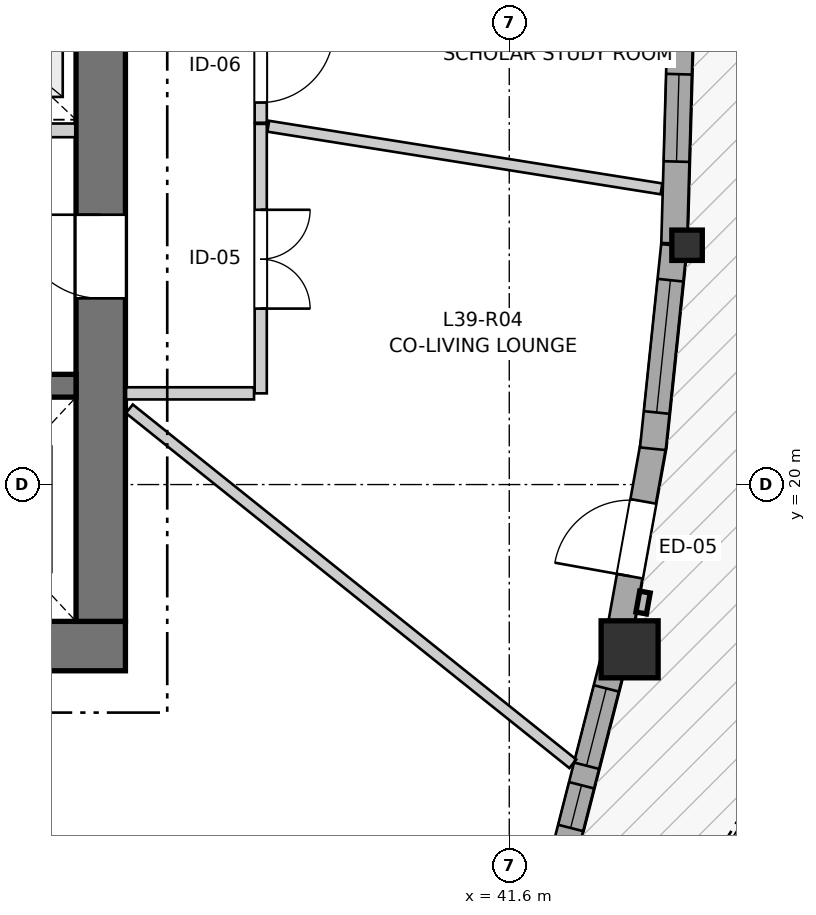
"""IFC4 building model, lengths in metres.
Left out: names, types, materials, properties, quantities, classifications, styles, units other than length and angle.
Written with IfcOpenShell. Run it as: python <this file> out.ifc"""

import sys

from ifc_helpers import new_model, si_unit, direction, frame, frame_2d, origin, origin_2d, place, context, subcontext, project, spatial, rectangle, i_section, extrude, source, transform, mapped, element, fill, save


model = new_model("IFC4")
c1 = context("Model", 3, precision=1e-05, world=origin(), true_north=direction((0.0, 1.0)))
c2 = subcontext(c1, "Body", "Model", "MODEL_VIEW")
j1 = project(units=[si_unit("LENGTHUNIT", "METRE"), si_unit("PLANEANGLEUNIT", "RADIAN")], contexts=[c1])
p1 = place(None, origin())
s1 = spatial("IfcSite", under=j1, at=p1, CompositionType="ELEMENT")
p2 = place(p1, origin())
s2 = spatial("IfcBuilding", under=s1, at=p2, CompositionType="ELEMENT")
p3 = place(p2, frame((0.0, 0.0, 133.0)))
s3 = spatial("IfcBuildingStorey", under=s2, at=p3, CompositionType="ELEMENT", Elevation=133.0)
p4 = place(p3, frame((24.15, 17.875, 0.0), z_axis=(0.0, 0.0, 1.0), x_axis=(1.0, 0.0, 0.0)))
e1 = element("IfcWall", 1, at=p4, inside=s3, PredefinedType="SHEAR", context=c2, shape_type="SweptSolid", body=[
    extrude(rectangle(XDim=12.4, YDim=0.65, at=frame_2d((6.2, 0.0))), origin(), (0.0, 0.0, 1.0), 2.95),
])
p5 = place(p3, frame((36.225, 18.2, 0.0), z_axis=(0.0, 0.0, 1.0), x_axis=(0.0, 1.0, 0.0)))
e2 = element("IfcWall", 2, at=p5, inside=s3, PredefinedType="SHEAR", context=c2, shape_type="SweptSolid", body=[
    extrude(rectangle(XDim=15.6, YDim=0.65, at=frame_2d((7.8, 0.0))), origin(), (0.0, 0.0, 1.0), 2.95),
])
p6 = place(p5, frame((4.25, 0.0, 0.0)))
e3 = element("IfcOpeningElement", 3, at=p6, cuts=e2, PredefinedType="OPENING", context=c2, shape_type="SweptSolid", body=[
    extrude(rectangle(XDim=1.1, YDim=2.15, at=frame_2d((0.55, 1.075))), frame((0.0, 0.335, 0.0), z_axis=(0.0, -1.0, 0.0), x_axis=(1.0, 0.0, 0.0)), (0.0, 0.0, 1.0), 0.67),
])
p7 = place(p5, frame((10.25, 0.0, 0.0)))
e4 = element("IfcOpeningElement", 4, at=p7, cuts=e2, PredefinedType="OPENING", context=c2, shape_type="SweptSolid", body=[
    extrude(rectangle(XDim=1.1, YDim=2.15, at=frame_2d((0.55, 1.075))), frame((0.0, 0.335, 0.0), z_axis=(0.0, -1.0, 0.0), x_axis=(1.0, 0.0, 0.0)), (0.0, 0.0, 1.0), 0.67),
])
p8 = place(p3, frame((24.8, 21.3, 0.0), z_axis=(0.0, 0.0, 1.0), x_axis=(1.0, 0.0, 0.0)))
e5 = element("IfcWall", 5, at=p8, inside=s3, PredefinedType="SHEAR", context=c2, shape_type="SweptSolid", body=[
    extrude(rectangle(XDim=11.1, YDim=0.3, at=frame_2d((5.55, 0.0))), origin(), (0.0, 0.0, 1.0), 2.95),
])
p9 = place(p8, frame((6.22, 0.0, 0.0)))
e6 = element("IfcOpeningElement", 6, at=p9, cuts=e5, PredefinedType="OPENING", context=c2, shape_type="SweptSolid", body=[
    extrude(rectangle(XDim=0.98, YDim=2.15, at=frame_2d((0.49, 1.075))), frame((0.0, 0.16, 0.0), z_axis=(0.0, -1.0, 0.0), x_axis=(1.0, 0.0, 0.0)), (0.0, 0.0, 1.0), 0.32),
])
p10 = place(p8, frame((9.15, 0.0, 0.0)))
e7 = element("IfcOpeningElement", 7, at=p10, cuts=e5, PredefinedType="OPENING", context=c2, shape_type="SweptSolid", body=[
    extrude(rectangle(XDim=1.15, YDim=2.15, at=frame_2d((0.575, 1.075))), frame((0.0, 0.16, 0.0), z_axis=(0.0, -1.0, 0.0), x_axis=(1.0, 0.0, 0.0)), (0.0, 0.0, 1.0), 0.32),
])
m1 = source(origin(), c2, "Body", "SweptSolid", [
    extrude(rectangle(XDim=0.75, YDim=0.75, at=origin_2d()), origin(), (0.0, 0.0, 1.0), 2.95),
])
p11 = place(p3, frame((43.184, 17.833, 0.0), z_axis=(0.0, 0.0, 1.0), x_axis=(1.0, 0.0, 0.0)))
e8 = element("IfcColumn", 8, at=p11, inside=s3, PredefinedType="COLUMN", context=c2, shape_type="MappedRepresentation", body=[
    mapped(m1, transform((0.0, 0.0, 0.0), x_axis=(1.0, 0.0, 0.0), y_axis=(0.0, 1.0, 0.0), z_axis=(0.0, 0.0, 1.0), scale=1.0)),
])
m2 = source(origin(), c2, "Body", "SweptSolid", [
    extrude(i_section(OverallWidth=0.401, OverallDepth=0.399, WebThickness=0.023, FlangeThickness=0.036, FilletRadius=0.015, at=origin_2d()), origin(), (0.0, 0.0, 1.0), 2.95),
])
p12 = place(p3, frame((43.939, 23.148, 0.0), z_axis=(0.0, 0.0, 1.0), x_axis=(1.0, 0.0, 0.0)))
e9 = element("IfcColumn", 9, at=p12, inside=s3, PredefinedType="PILASTER", context=c2, shape_type="MappedRepresentation", body=[
    mapped(m2, transform((0.0, 0.0, 0.0), x_axis=(1.0, 0.0, 0.0), y_axis=(0.0, 1.0, 0.0), z_axis=(0.0, 0.0, 1.0), scale=1.0)),
])
p13 = place(p3, frame((42.329, 15.177, 0.0), z_axis=(0.0, 0.0, 1.0), x_axis=(0.247819063092, 0.968806333571, 0.0)))
e10 = element("IfcWall", 10, at=p13, inside=s3, PredefinedType="SOLIDWALL", context=c2, shape_type="SweptSolid", body=[
    extrude(rectangle(XDim=2.629, YDim=0.34, at=frame_2d((1.315, 0.0))), origin(), (0.0, 0.0, 1.0), 2.53),
])
p14 = place(p13, frame((0.315, 0.0, 0.82)))
e11 = element("IfcOpeningElement", 11, at=p14, cuts=e10, PredefinedType="OPENING", context=c2, shape_type="SweptSolid", body=[
    extrude(rectangle(XDim=0.58, YDim=1.35, at=frame_2d((0.29, 0.675))), frame((0.0, 0.18, 0.0), z_axis=(0.0, -1.0, 0.0), x_axis=(1.0, 0.0, 0.0)), (0.0, 0.0, 1.0), 0.36),
])
p15 = place(p13, frame((1.16, 0.0, 0.82)))
e12 = element("IfcOpeningElement", 12, at=p15, cuts=e10, PredefinedType="OPENING", context=c2, shape_type="SweptSolid", body=[
    extrude(rectangle(XDim=1.05, YDim=1.45, at=frame_2d((0.525, 0.725))), frame((0.0, 0.18, 0.0), z_axis=(0.0, -1.0, 0.0), x_axis=(1.0, 0.0, 0.0)), (0.0, 0.0, 1.0), 0.36),
])
p16 = place(p3, frame((43.044, 18.015, 0.0), z_axis=(0.0, 0.0, 1.0), x_axis=(0.177114569603, 0.984190240367, 0.0)))
e13 = element("IfcWall", 13, at=p16, inside=s3, PredefinedType="SOLIDWALL", context=c2, shape_type="SweptSolid", body=[
    extrude(rectangle(XDim=2.584, YDim=0.34, at=frame_2d((1.292, 0.0))), origin(), (0.0, 0.0, 1.0), 2.53),
])
p17 = place(p16, frame((0.792, 0.0, 0.0)))
e14 = element("IfcOpeningElement", 14, at=p17, cuts=e13, PredefinedType="OPENING", context=c2, shape_type="SweptSolid", body=[
    extrude(rectangle(XDim=1.0, YDim=2.1, at=frame_2d((0.5, 1.05))), frame((0.0, 0.18, 0.0), z_axis=(0.0, -1.0, 0.0), x_axis=(1.0, 0.0, 0.0)), (0.0, 0.0, 1.0), 0.36),
])
p18 = place(p3, frame((43.49, 20.471, 0.0), z_axis=(0.0, 0.0, 1.0), x_axis=(0.103673439924, 0.99461139037, 0.0)))
e15 = element("IfcWall", 15, at=p18, inside=s3, PredefinedType="SOLIDWALL", context=c2, shape_type="SweptSolid", body=[
    extrude(rectangle(XDim=2.689, YDim=0.34, at=frame_2d((1.345, 0.0))), origin(), (0.0, 0.0, 1.0), 2.53),
])
p19 = place(p18, frame((0.48, 0.0, 0.82)))
e16 = element("IfcOpeningElement", 16, at=p19, cuts=e15, PredefinedType="OPENING", context=c2, shape_type="SweptSolid", body=[
    extrude(rectangle(XDim=1.75, YDim=1.3, at=frame_2d((0.875, 0.65))), frame((0.0, 0.18, 0.0), z_axis=(0.0, -1.0, 0.0), x_axis=(1.0, 0.0, 0.0)), (0.0, 0.0, 1.0), 0.36),
])
p20 = place(p3, frame((43.77, 23.173, 0.0), z_axis=(0.0, 0.0, 1.0), x_axis=(0.028392968923, 0.999596838388, 0.0)))
e17 = element("IfcWall", 17, at=p20, inside=s3, PredefinedType="SOLIDWALL", context=c2, shape_type="SweptSolid", body=[
    extrude(rectangle(XDim=2.674, YDim=0.34, at=frame_2d((1.337, 0.0))), origin(), (0.0, 0.0, 1.0), 2.53),
])
p21 = place(p20, frame((1.076, 0.0, 0.82)))
e18 = element("IfcOpeningElement", 18, at=p21, cuts=e17, PredefinedType="OPENING", context=c2, shape_type="SweptSolid", body=[
    extrude(rectangle(XDim=1.15, YDim=1.2, at=frame_2d((0.575, 0.6))), frame((0.0, 0.18, 0.0), z_axis=(0.0, -1.0, 0.0), x_axis=(1.0, 0.0, 0.0)), (0.0, 0.0, 1.0), 0.36),
])
p22 = place(p3, frame((30.67, 24.66, 0.0), z_axis=(0.0, 0.0, 1.0), x_axis=(1.0, 0.0, 0.0)))
e19 = element("IfcWall", 19, at=p22, inside=s3, PredefinedType="PARTITIONING", context=c2, shape_type="SweptSolid", body=[
    extrude(rectangle(XDim=5.22, YDim=0.18, at=frame_2d((2.61, 0.0))), origin(), (0.0, 0.0, 1.0), 2.95),
])
p23 = place(p22, frame((0.68, 0.0, 0.0)))
e20 = element("IfcOpeningElement", 20, at=p23, cuts=e19, PredefinedType="OPENING", context=c2, shape_type="SweptSolid", body=[
    extrude(rectangle(XDim=0.98, YDim=2.15, at=frame_2d((0.49, 1.075))), frame((0.0, 0.1, 0.0), z_axis=(0.0, -1.0, 0.0), x_axis=(1.0, 0.0, 0.0)), (0.0, 0.0, 1.0), 0.2),
])
p24 = place(p3, frame((38.33, 24.745, 0.0), z_axis=(0.0, 0.0, 1.0), x_axis=(0.0, -1.0, 0.0)))
e21 = element("IfcWall", 21, at=p24, inside=s3, PredefinedType="PARTITIONING", context=c2, shape_type="SweptSolid", body=[
    extrude(rectangle(XDim=3.545, YDim=0.16, at=frame_2d((1.772, 0.0))), origin(), (0.0, 0.0, 1.0), 2.95),
])
p25 = place(p24, frame((1.13, 0.0, 0.0)))
e22 = element("IfcOpeningElement", 22, at=p25, cuts=e21, PredefinedType="OPENING", context=c2, shape_type="SweptSolid", body=[
    extrude(rectangle(XDim=1.3, YDim=2.1, at=frame_2d((0.65, 1.05))), frame((0.0, 0.09, 0.0), z_axis=(0.0, -1.0, 0.0), x_axis=(1.0, 0.0, 0.0)), (0.0, 0.0, 1.0), 0.18),
])
p26 = place(p3, frame((38.33, 26.252, 0.0), z_axis=(0.0, 0.0, 1.0), x_axis=(0.0, -1.0, 0.0)))
e23 = element("IfcWall", 23, at=p26, inside=s3, PredefinedType="PARTITIONING", context=c2, shape_type="SweptSolid", body=[
    extrude(rectangle(XDim=1.492, YDim=0.16, at=frame_2d((0.746, 0.0))), origin(), (0.0, 0.0, 1.0), 2.95),
])
p27 = place(p26, frame((0.266, 0.0, 0.0)))
e24 = element("IfcOpeningElement", 24, at=p27, cuts=e23, PredefinedType="OPENING", context=c2, shape_type="SweptSolid", body=[
    extrude(rectangle(XDim=0.96, YDim=2.1, at=frame_2d((0.48, 1.05))), frame((0.0, 0.09, 0.0), z_axis=(0.0, -1.0, 0.0), x_axis=(1.0, 0.0, 0.0)), (0.0, 0.0, 1.0), 0.18),
])
p28 = place(p3, frame((36.602, 20.997, 0.0), z_axis=(0.0, 0.0, 1.0), x_axis=(0.780696683128, -0.624910144703, 0.0)))
e25 = element("IfcWall", 25, at=p28, inside=s3, PredefinedType="PARTITIONING", context=c2, shape_type="SweptSolid", body=[
    extrude(rectangle(XDim=7.474, YDim=0.145, at=frame_2d((3.737, 0.0))), origin(), (0.0, 0.0, 1.0), 2.95),
])
p29 = place(p3, frame((38.429, 24.714, 0.0), z_axis=(0.0, 0.0, 1.0), x_axis=(0.987561894046, -0.157230739454, 0.0)))
e26 = element("IfcWall", 26, at=p29, inside=s3, PredefinedType="PARTITIONING", context=c2, shape_type="SweptSolid", body=[
    extrude(rectangle(XDim=5.239, YDim=0.145, at=frame_2d((2.62, 0.0))), origin(), (0.0, 0.0, 1.0), 2.95),
])
p30 = place(p3, frame((36.558, 21.2, 0.0), z_axis=(0.0, 0.0, 1.0), x_axis=(1.0, 0.0, 0.0)))
e27 = element("IfcWall", 27, at=p30, inside=s3, PredefinedType="PARTITIONING", context=c2, shape_type="SweptSolid", body=[
    extrude(rectangle(XDim=1.684, YDim=0.16, at=frame_2d((0.842, 0.0))), origin(), (0.0, 0.0, 1.0), 2.95),
])
m3 = source(origin(), c2, "Body", "SweptSolid", [
    extrude(rectangle(XDim=0.58, YDim=1.35, at=frame_2d((0.29, 0.675))), frame((0.0, 0.03, 0.0), z_axis=(0.0, -1.0, 0.0), x_axis=(1.0, 0.0, 0.0)), (0.0, 0.0, 1.0), 0.06),
])
p31 = place(p14, origin())
e28 = element("IfcWindow", 28, at=p31, inside=s3, PartitioningType="SINGLE_PANEL", PredefinedType="WINDOW", context=c2, shape_type="MappedRepresentation", body=[
    mapped(m3, transform((0.0, 0.0, 0.0), x_axis=(1.0, 0.0, 0.0), y_axis=(0.0, 1.0, 0.0), z_axis=(0.0, 0.0, 1.0), scale=1.0)),
])
fill(e11, e28)
m4 = source(origin(), c2, "Body", "SweptSolid", [
    extrude(rectangle(XDim=1.05, YDim=1.45, at=frame_2d((0.525, 0.725))), frame((0.0, 0.03, 0.0), z_axis=(0.0, -1.0, 0.0), x_axis=(1.0, 0.0, 0.0)), (0.0, 0.0, 1.0), 0.06),
])
p32 = place(p15, origin())
e29 = element("IfcWindow", 29, at=p32, inside=s3, PartitioningType="SINGLE_PANEL", PredefinedType="WINDOW", context=c2, shape_type="MappedRepresentation", body=[
    mapped(m4, transform((0.0, 0.0, 0.0), x_axis=(1.0, 0.0, 0.0), y_axis=(0.0, 1.0, 0.0), z_axis=(0.0, 0.0, 1.0), scale=1.0)),
])
fill(e12, e29)
m5 = source(origin(), c2, "Body", "SweptSolid", [
    extrude(rectangle(XDim=1.75, YDim=1.3, at=frame_2d((0.875, 0.65))), frame((0.0, 0.03, 0.0), z_axis=(0.0, -1.0, 0.0), x_axis=(1.0, 0.0, 0.0)), (0.0, 0.0, 1.0), 0.06),
])
p33 = place(p19, origin())
e30 = element("IfcWindow", 30, at=p33, inside=s3, PartitioningType="SINGLE_PANEL", PredefinedType="WINDOW", context=c2, shape_type="MappedRepresentation", body=[
    mapped(m5, transform((0.0, 0.0, 0.0), x_axis=(1.0, 0.0, 0.0), y_axis=(0.0, 1.0, 0.0), z_axis=(0.0, 0.0, 1.0), scale=1.0)),
])
fill(e16, e30)
m6 = source(origin(), c2, "Body", "SweptSolid", [
    extrude(rectangle(XDim=1.15, YDim=1.2, at=frame_2d((0.575, 0.6))), frame((0.0, 0.03, 0.0), z_axis=(0.0, -1.0, 0.0), x_axis=(1.0, 0.0, 0.0)), (0.0, 0.0, 1.0), 0.06),
])
p34 = place(p21, origin())
e31 = element("IfcWindow", 31, at=p34, inside=s3, PartitioningType="SINGLE_PANEL", PredefinedType="WINDOW", context=c2, shape_type="MappedRepresentation", body=[
    mapped(m6, transform((0.0, 0.0, 0.0), x_axis=(1.0, 0.0, 0.0), y_axis=(0.0, 1.0, 0.0), z_axis=(0.0, 0.0, 1.0), scale=1.0)),
])
fill(e18, e31)
m7 = source(origin(), c2, "Body", "SweptSolid", [
    extrude(rectangle(XDim=1.0, YDim=2.1, at=frame_2d((0.5, 1.05))), frame((0.0, 0.025, 0.0), z_axis=(0.0, -1.0, 0.0), x_axis=(1.0, 0.0, 0.0)), (0.0, 0.0, 1.0), 0.05),
])
p35 = place(p17, origin())
e32 = element("IfcDoor", 32, at=p35, inside=s3, OperationType="SINGLE_SWING_LEFT", PredefinedType="DOOR", context=c2, shape_type="MappedRepresentation", body=[
    mapped(m7, transform((0.0, 0.0, 0.0), x_axis=(1.0, 0.0, 0.0), y_axis=(0.0, 1.0, 0.0), z_axis=(0.0, 0.0, 1.0), scale=1.0)),
])
fill(e14, e32)
m8 = source(origin(), c2, "Body", "SweptSolid", [
    extrude(rectangle(XDim=1.1, YDim=2.15, at=frame_2d((0.55, 1.075))), frame((0.0, 0.025, 0.0), z_axis=(0.0, -1.0, 0.0), x_axis=(1.0, 0.0, 0.0)), (0.0, 0.0, 1.0), 0.05),
])
p36 = place(p6, origin())
e33 = element("IfcDoor", 33, at=p36, inside=s3, OperationType="SINGLE_SWING_RIGHT", PredefinedType="DOOR", context=c2, shape_type="MappedRepresentation", body=[
    mapped(m8, transform((0.0, 0.0, 0.0), x_axis=(1.0, 0.0, 0.0), y_axis=(0.0, 1.0, 0.0), z_axis=(0.0, 0.0, 1.0), scale=1.0)),
])
fill(e3, e33)
m9 = source(origin(), c2, "Body", "SweptSolid", [
    extrude(rectangle(XDim=1.3, YDim=2.1, at=frame_2d((0.65, 1.05))), frame((0.0, 0.025, 0.0), z_axis=(0.0, -1.0, 0.0), x_axis=(1.0, 0.0, 0.0)), (0.0, 0.0, 1.0), 0.05),
])
p37 = place(p25, origin())
e34 = element("IfcDoor", 34, at=p37, inside=s3, OperationType="DOUBLE_DOOR_SINGLE_SWING", PredefinedType="DOOR", context=c2, shape_type="MappedRepresentation", body=[
    mapped(m9, transform((0.0, 0.0, 0.0), x_axis=(1.0, 0.0, 0.0), y_axis=(0.0, 1.0, 0.0), z_axis=(0.0, 0.0, 1.0), scale=1.0)),
])
fill(e22, e34)
m10 = source(origin(), c2, "Body", "SweptSolid", [
    extrude(rectangle(XDim=0.96, YDim=2.1, at=frame_2d((0.48, 1.05))), frame((0.0, 0.025, 0.0), z_axis=(0.0, -1.0, 0.0), x_axis=(1.0, 0.0, 0.0)), (0.0, 0.0, 1.0), 0.05),
])
p38 = place(p27, origin())
e35 = element("IfcDoor", 35, at=p38, inside=s3, OperationType="SINGLE_SWING_LEFT", PredefinedType="DOOR", context=c2, shape_type="MappedRepresentation", body=[
    mapped(m10, transform((0.0, 0.0, 0.0), x_axis=(1.0, 0.0, 0.0), y_axis=(0.0, 1.0, 0.0), z_axis=(0.0, 0.0, 1.0), scale=1.0)),
])
fill(e24, e35)
save(model, sys.argv[1])
